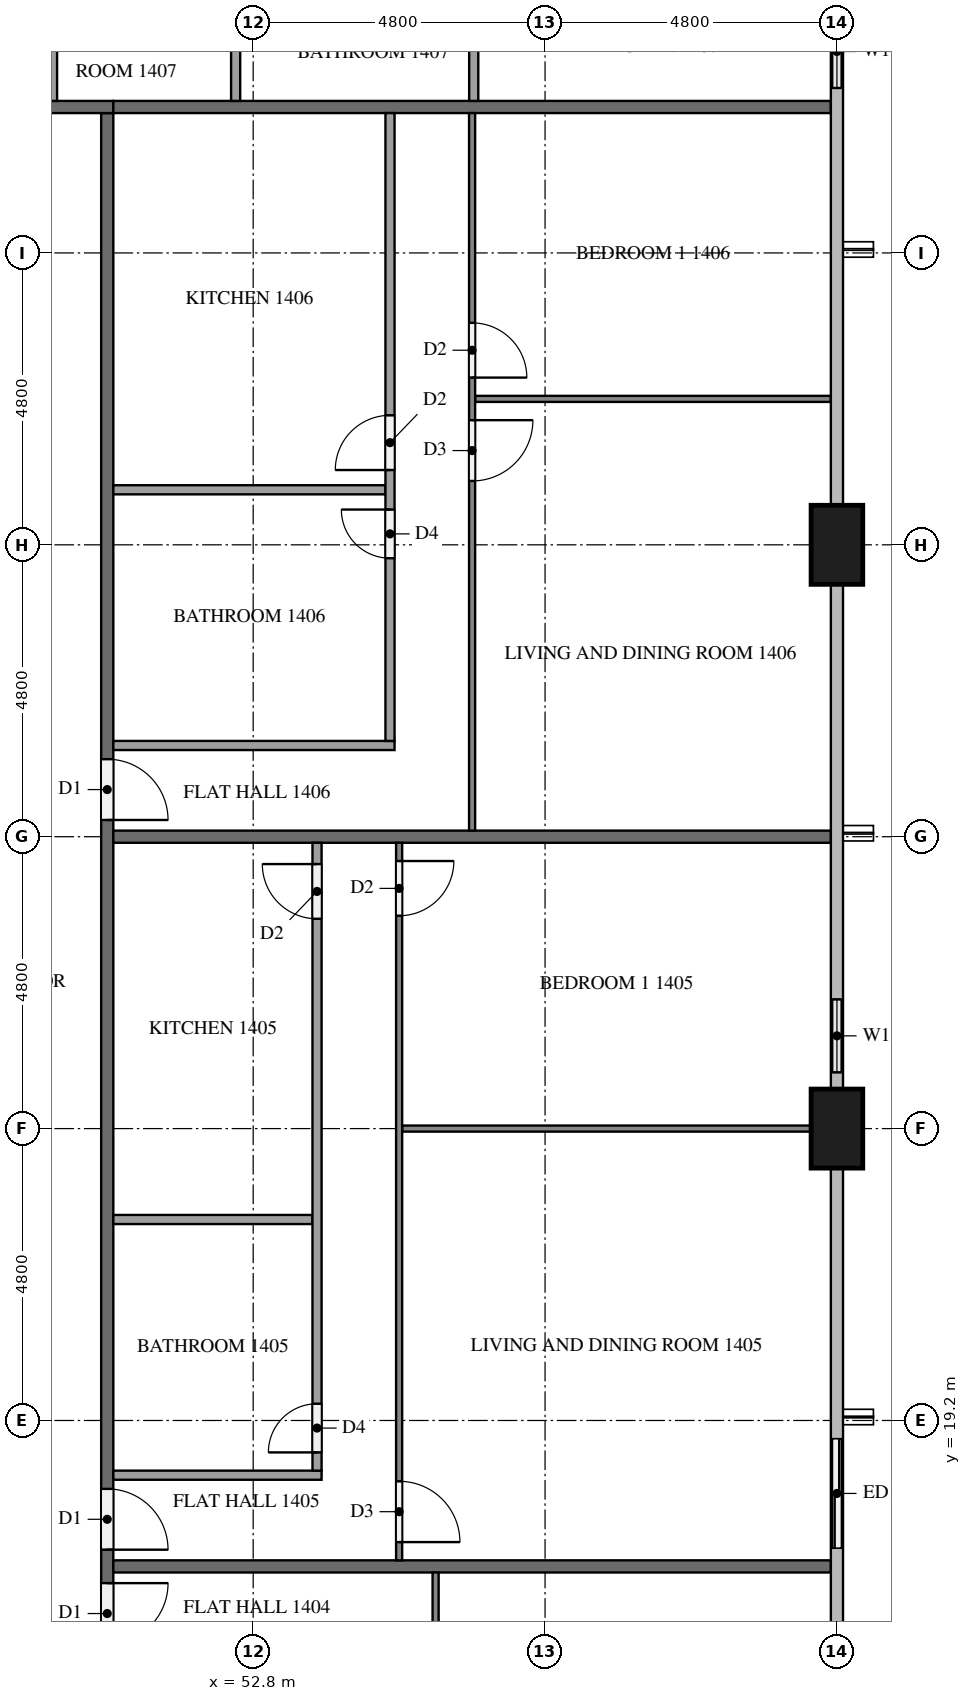
"""IFC4 building model, lengths in metres.
Left out: names, types, materials, properties, quantities, classifications, styles, units other than length and angle.
Written with IfcOpenShell. Run it as: python <this file> out.ifc"""

import sys

from ifc_helpers import new_model, si_unit, direction, frame, frame_2d, origin, origin_2d, place, context, subcontext, project, spatial, rectangle, extrude, element, fill, save


model = new_model("IFC4")
c1 = context("Model", 3, precision=1e-05, world=origin(), true_north=direction((0.0, 1.0)))
c2 = subcontext(c1, "Body", "Model", "MODEL_VIEW")
j1 = project(units=[si_unit("LENGTHUNIT", "METRE"), si_unit("PLANEANGLEUNIT", "RADIAN")], contexts=[c1])
p1 = place(None, origin())
s1 = spatial("IfcSite", under=j1, at=p1, CompositionType="ELEMENT")
p2 = place(p1, origin())
s2 = spatial("IfcBuilding", under=s1, at=p2, CompositionType="ELEMENT")
p3 = place(p2, frame((0.0, 0.0, 59.3)))
s3 = spatial("IfcBuildingStorey", under=s2, at=p3, CompositionType="ELEMENT", Elevation=59.3)
for number, where, z_axis, x_axis in (
    (1, (62.4, 24.0, 0.0), (0.0, 0.0, 1.0), (0.0, 1.0, 0.0)),
    (2, (62.4, 33.6, 0.0), (0.0, 0.0, 1.0), (0.0, 1.0, 0.0)),
):
    element("IfcColumn", number, at=place(p3, frame(where, z_axis=z_axis, x_axis=x_axis)), inside=s3, PredefinedType="COLUMN", context=c2, shape_type="SweptSolid", body=[
        extrude(rectangle(XDim=1.3, YDim=0.85, at=origin_2d()), origin(), (0.0, 0.0, 1.0), 3.2),
    ])
p4 = place(p3, frame((62.4, 16.8, 0.0), z_axis=(0.0, 0.0, 1.0), x_axis=(0.0, 1.0, 0.0)))
e3 = element("IfcWall", 3, at=p4, inside=s3, PredefinedType="SOLIDWALL", context=c2, shape_type="SweptSolid", body=[
    extrude(rectangle(XDim=2.4, YDim=0.15, at=frame_2d((1.2, 0.0))), origin(), (0.0, 0.0, 1.0), 3.2),
])
p5 = place(p4, frame((0.3, 0.0, 0.0)))
e4 = element("IfcOpeningElement", 4, at=p5, cuts=e3, PredefinedType="OPENING", context=c2, shape_type="SweptSolid", body=[
    extrude(rectangle(XDim=1.8, YDim=2.4, at=frame_2d((0.9, 1.2))), frame((0.0, 0.085, 0.0), z_axis=(0.0, -1.0, 0.0), x_axis=(1.0, 0.0, 0.0)), (0.0, 0.0, 1.0), 0.17),
])
p6 = place(p3, frame((62.4, 24.65, 0.0), z_axis=(0.0, 0.0, 1.0), x_axis=(0.0, 1.0, 0.0)))
e5 = element("IfcWall", 5, at=p6, inside=s3, PredefinedType="SOLIDWALL", context=c2, shape_type="SweptSolid", body=[
    extrude(rectangle(XDim=1.75, YDim=0.15, at=frame_2d((0.875, 0.0))), origin(), (0.0, 0.0, 1.0), 3.2),
])
p7 = place(p6, frame((0.275, 0.0, 0.9)))
e6 = element("IfcOpeningElement", 6, at=p7, cuts=e5, PredefinedType="OPENING", context=c2, shape_type="SweptSolid", body=[
    extrude(rectangle(XDim=1.2, YDim=1.4, at=frame_2d((0.6, 0.7))), frame((0.0, 0.085, 0.0), z_axis=(0.0, -1.0, 0.0), x_axis=(1.0, 0.0, 0.0)), (0.0, 0.0, 1.0), 0.17),
])
p8 = place(p3, frame((62.4, 40.8, 0.0), z_axis=(0.0, 0.0, 1.0), x_axis=(0.0, 1.0, 0.0)))
e7 = element("IfcWall", 7, at=p8, inside=s3, PredefinedType="SOLIDWALL", context=c2, shape_type="SweptSolid", body=[
    extrude(rectangle(XDim=1.825, YDim=0.15, at=frame_2d((0.913, 0.0))), origin(), (0.0, 0.0, 1.0), 3.2),
])
p9 = place(p8, frame((0.312, 0.0, 0.9)))
e8 = element("IfcOpeningElement", 8, at=p9, cuts=e7, PredefinedType="OPENING", context=c2, shape_type="SweptSolid", body=[
    extrude(rectangle(XDim=1.2, YDim=1.4, at=frame_2d((0.6, 0.7))), frame((0.0, 0.085, 0.0), z_axis=(0.0, -1.0, 0.0), x_axis=(1.0, 0.0, 0.0)), (0.0, 0.0, 1.0), 0.17),
])
p10 = place(p3, frame((50.4, 40.7, 0.0), z_axis=(0.0, 0.0, 1.0), x_axis=(0.0, -1.0, 0.0)))
e9 = element("IfcWall", 9, at=p10, inside=s3, PredefinedType="PARTITIONING", context=c2, shape_type="SweptSolid", body=[
    extrude(rectangle(XDim=28.6, YDim=0.2, at=frame_2d((14.3, 0.0))), origin(), (0.0, 0.0, 1.0), 3.2),
])
p11 = place(p10, frame((24.175, 0.0, 0.0)))
e10 = element("IfcOpeningElement", 10, at=p11, cuts=e9, PredefinedType="OPENING", context=c2, shape_type="SweptSolid", body=[
    extrude(rectangle(XDim=1.0, YDim=2.1, at=frame_2d((0.5, 1.05))), frame((0.0, 0.11, 0.0), z_axis=(0.0, -1.0, 0.0), x_axis=(1.0, 0.0, 0.0)), (0.0, 0.0, 1.0), 0.22),
])
p12 = place(p10, frame((22.625, 0.0, 0.0)))
e11 = element("IfcOpeningElement", 11, at=p12, cuts=e9, PredefinedType="OPENING", context=c2, shape_type="SweptSolid", body=[
    extrude(rectangle(XDim=1.0, YDim=2.1, at=frame_2d((0.5, 1.05))), frame((0.0, 0.11, 0.0), z_axis=(0.0, -1.0, 0.0), x_axis=(1.0, 0.0, 0.0)), (0.0, 0.0, 1.0), 0.22),
])
p13 = place(p10, frame((10.625, 0.0, 0.0)))
e12 = element("IfcOpeningElement", 12, at=p13, cuts=e9, PredefinedType="OPENING", context=c2, shape_type="SweptSolid", body=[
    extrude(rectangle(XDim=1.0, YDim=2.1, at=frame_2d((0.5, 1.05))), frame((0.0, 0.11, 0.0), z_axis=(0.0, -1.0, 0.0), x_axis=(1.0, 0.0, 0.0)), (0.0, 0.0, 1.0), 0.22),
])
p14 = place(p3, frame((11.9, 40.8, 0.0), z_axis=(0.0, 0.0, 1.0), x_axis=(1.0, 0.0, 0.0)))
e13 = element("IfcWall", 13, at=p14, inside=s3, PredefinedType="PARTITIONING", context=c2, shape_type="SweptSolid", body=[
    extrude(rectangle(XDim=38.6, YDim=0.2, at=frame_2d((19.3, 0.0))), origin(), (0.0, 0.0, 1.0), 3.2),
])
p15 = place(p14, frame((36.375, 0.0, 0.0)))
e14 = element("IfcOpeningElement", 14, at=p15, cuts=e13, PredefinedType="OPENING", context=c2, shape_type="SweptSolid", body=[
    extrude(rectangle(XDim=1.0, YDim=2.1, at=frame_2d((0.5, 1.05))), frame((0.0, 0.11, 0.0), z_axis=(0.0, -1.0, 0.0), x_axis=(1.0, 0.0, 0.0)), (0.0, 0.0, 1.0), 0.22),
])
p16 = place(p14, frame((17.125, 0.0, 0.0)))
e15 = element("IfcOpeningElement", 15, at=p16, cuts=e13, PredefinedType="OPENING", context=c2, shape_type="SweptSolid", body=[
    extrude(rectangle(XDim=1.1, YDim=2.1, at=frame_2d((0.55, 1.05))), frame((0.0, 0.11, 0.0), z_axis=(0.0, -1.0, 0.0), x_axis=(1.0, 0.0, 0.0)), (0.0, 0.0, 1.0), 0.22),
])
p17 = place(p14, frame((15.625, 0.0, 0.0)))
e16 = element("IfcOpeningElement", 16, at=p17, cuts=e13, PredefinedType="OPENING", context=c2, shape_type="SweptSolid", body=[
    extrude(rectangle(XDim=1.0, YDim=2.1, at=frame_2d((0.5, 1.05))), frame((0.0, 0.11, 0.0), z_axis=(0.0, -1.0, 0.0), x_axis=(1.0, 0.0, 0.0)), (0.0, 0.0, 1.0), 0.22),
])
p18 = place(p14, frame((1.225, 0.0, 0.0)))
e17 = element("IfcOpeningElement", 17, at=p18, cuts=e13, PredefinedType="OPENING", context=c2, shape_type="SweptSolid", body=[
    extrude(rectangle(XDim=1.0, YDim=2.1, at=frame_2d((0.5, 1.05))), frame((0.0, 0.11, 0.0), z_axis=(0.0, -1.0, 0.0), x_axis=(1.0, 0.0, 0.0)), (0.0, 0.0, 1.0), 0.22),
])
for number, where, z_axis, x_axis in (
    (18, (50.5, 16.8, 0.0), (0.0, 0.0, 1.0), (1.0, 0.0, 0.0)),
    (19, (50.5, 28.8, 0.0), (0.0, 0.0, 1.0), (1.0, 0.0, 0.0)),
    (20, (50.5, 40.8, 0.0), (0.0, 0.0, 1.0), (1.0, 0.0, 0.0)),
):
    element("IfcWall", number, at=place(p3, frame(where, z_axis=z_axis, x_axis=x_axis)), inside=s3, PredefinedType="PARTITIONING", context=c2, shape_type="SweptSolid", body=[
        extrude(rectangle(XDim=11.8, YDim=0.2, at=frame_2d((5.9, 0.0))), origin(), (0.0, 0.0, 1.0), 3.2),
    ])
p19 = place(p3, frame((55.8, 16.7, 0.0), z_axis=(0.0, 0.0, 1.0), x_axis=(0.0, -1.0, 0.0)))
e21 = element("IfcWall", 21, at=p19, inside=s3, PredefinedType="PARTITIONING", context=c2, shape_type="SweptSolid", body=[
    extrude(rectangle(XDim=16.6, YDim=0.1, at=frame_2d((8.3, 0.0))), origin(), (0.0, 0.0, 1.0), 3.2),
])
p20 = place(p19, frame((5.75, 0.0, 0.0)))
e22 = element("IfcOpeningElement", 22, at=p20, cuts=e21, PredefinedType="OPENING", context=c2, shape_type="SweptSolid", body=[
    extrude(rectangle(XDim=1.0, YDim=2.1, at=frame_2d((0.5, 1.05))), frame((0.0, 0.06, 0.0), z_axis=(0.0, -1.0, 0.0), x_axis=(1.0, 0.0, 0.0)), (0.0, 0.0, 1.0), 0.12),
])
p21 = place(p19, frame((7.45, 0.0, 0.0)))
e23 = element("IfcOpeningElement", 23, at=p21, cuts=e21, PredefinedType="OPENING", context=c2, shape_type="SweptSolid", body=[
    extrude(rectangle(XDim=0.9, YDim=2.1, at=frame_2d((0.45, 1.05))), frame((0.0, 0.06, 0.0), z_axis=(0.0, -1.0, 0.0), x_axis=(1.0, 0.0, 0.0)), (0.0, 0.0, 1.0), 0.12),
])
p22 = place(p19, frame((15.2, 0.0, 0.0)))
e24 = element("IfcOpeningElement", 24, at=p22, cuts=e21, PredefinedType="OPENING", context=c2, shape_type="SweptSolid", body=[
    extrude(rectangle(XDim=0.9, YDim=2.1, at=frame_2d((0.45, 1.05))), frame((0.0, 0.06, 0.0), z_axis=(0.0, -1.0, 0.0), x_axis=(1.0, 0.0, 0.0)), (0.0, 0.0, 1.0), 0.12),
])
p23 = place(p3, frame((55.25, 24.0, 0.0), z_axis=(0.0, 0.0, 1.0), x_axis=(1.0, 0.0, 0.0)))
e25 = element("IfcWall", 25, at=p23, inside=s3, PredefinedType="PARTITIONING", context=c2, shape_type="SweptSolid", body=[
    extrude(rectangle(XDim=6.725, YDim=0.1, at=frame_2d((3.363, 0.0))), origin(), (0.0, 0.0, 1.0), 3.2),
])
p24 = place(p3, frame((55.2, 28.7, 0.0), z_axis=(0.0, 0.0, 1.0), x_axis=(0.0, -1.0, 0.0)))
e26 = element("IfcWall", 26, at=p24, inside=s3, PredefinedType="PARTITIONING", context=c2, shape_type="SweptSolid", body=[
    extrude(rectangle(XDim=11.8, YDim=0.1, at=frame_2d((5.9, 0.0))), origin(), (0.0, 0.0, 1.0), 3.2),
])
p25 = place(p24, frame((10.5, 0.0, 0.0)))
e27 = element("IfcOpeningElement", 27, at=p25, cuts=e26, PredefinedType="OPENING", context=c2, shape_type="SweptSolid", body=[
    extrude(rectangle(XDim=1.0, YDim=2.1, at=frame_2d((0.5, 1.05))), frame((0.0, 0.06, 0.0), z_axis=(0.0, -1.0, 0.0), x_axis=(1.0, 0.0, 0.0)), (0.0, 0.0, 1.0), 0.12),
])
p26 = place(p24, frame((0.3, 0.0, 0.0)))
e28 = element("IfcOpeningElement", 28, at=p26, cuts=e26, PredefinedType="OPENING", context=c2, shape_type="SweptSolid", body=[
    extrude(rectangle(XDim=0.9, YDim=2.1, at=frame_2d((0.45, 1.05))), frame((0.0, 0.06, 0.0), z_axis=(0.0, -1.0, 0.0), x_axis=(1.0, 0.0, 0.0)), (0.0, 0.0, 1.0), 0.12),
])
p27 = place(p3, frame((50.5, 22.505, 0.0), z_axis=(0.0, 0.0, 1.0), x_axis=(1.0, 0.0, 0.0)))
e29 = element("IfcWall", 29, at=p27, inside=s3, PredefinedType="PARTITIONING", context=c2, shape_type="SweptSolid", body=[
    extrude(rectangle(XDim=3.275, YDim=0.15, at=frame_2d((1.637, 0.0))), origin(), (0.0, 0.0, 1.0), 3.2),
])
p28 = place(p3, frame((50.5, 18.3, 0.0), z_axis=(0.0, 0.0, 1.0), x_axis=(1.0, 0.0, 0.0)))
e30 = element("IfcWall", 30, at=p28, inside=s3, PredefinedType="PARTITIONING", context=c2, shape_type="SweptSolid", body=[
    extrude(rectangle(XDim=3.425, YDim=0.15, at=frame_2d((1.712, 0.0))), origin(), (0.0, 0.0, 1.0), 3.2),
])
p29 = place(p3, frame((53.85, 18.375, 0.0), z_axis=(0.0, 0.0, 1.0), x_axis=(0.0, 1.0, 0.0)))
e31 = element("IfcWall", 31, at=p29, inside=s3, PredefinedType="PARTITIONING", context=c2, shape_type="SweptSolid", body=[
    extrude(rectangle(XDim=10.325, YDim=0.15, at=frame_2d((5.163, 0.0))), origin(), (0.0, 0.0, 1.0), 3.2),
])
p30 = place(p29, frame((0.3, 0.0, 0.0)))
e32 = element("IfcOpeningElement", 32, at=p30, cuts=e31, PredefinedType="OPENING", context=c2, shape_type="SweptSolid", body=[
    extrude(rectangle(XDim=0.8, YDim=2.1, at=frame_2d((0.4, 1.05))), frame((0.0, 0.085, 0.0), z_axis=(0.0, -1.0, 0.0), x_axis=(1.0, 0.0, 0.0)), (0.0, 0.0, 1.0), 0.17),
])
p31 = place(p29, frame((9.075, 0.0, 0.0)))
e33 = element("IfcOpeningElement", 33, at=p31, cuts=e31, PredefinedType="OPENING", context=c2, shape_type="SweptSolid", body=[
    extrude(rectangle(XDim=0.9, YDim=2.1, at=frame_2d((0.45, 1.05))), frame((0.0, 0.085, 0.0), z_axis=(0.0, -1.0, 0.0), x_axis=(1.0, 0.0, 0.0)), (0.0, 0.0, 1.0), 0.17),
])
p32 = place(p3, frame((56.45, 36.0, 0.0), z_axis=(0.0, 0.0, 1.0), x_axis=(1.0, 0.0, 0.0)))
e34 = element("IfcWall", 34, at=p32, inside=s3, PredefinedType="PARTITIONING", context=c2, shape_type="SweptSolid", body=[
    extrude(rectangle(XDim=5.85, YDim=0.1, at=frame_2d((2.925, 0.0))), origin(), (0.0, 0.0, 1.0), 3.2),
])
p33 = place(p3, frame((56.4, 40.7, 0.0), z_axis=(0.0, 0.0, 1.0), x_axis=(0.0, -1.0, 0.0)))
e35 = element("IfcWall", 35, at=p33, inside=s3, PredefinedType="PARTITIONING", context=c2, shape_type="SweptSolid", body=[
    extrude(rectangle(XDim=11.8, YDim=0.1, at=frame_2d((5.9, 0.0))), origin(), (0.0, 0.0, 1.0), 3.2),
])
p34 = place(p33, frame((5.05, 0.0, 0.0)))
e36 = element("IfcOpeningElement", 36, at=p34, cuts=e35, PredefinedType="OPENING", context=c2, shape_type="SweptSolid", body=[
    extrude(rectangle(XDim=1.0, YDim=2.1, at=frame_2d((0.5, 1.05))), frame((0.0, 0.06, 0.0), z_axis=(0.0, -1.0, 0.0), x_axis=(1.0, 0.0, 0.0)), (0.0, 0.0, 1.0), 0.12),
])
p35 = place(p33, frame((3.45, 0.0, 0.0)))
e37 = element("IfcOpeningElement", 37, at=p35, cuts=e35, PredefinedType="OPENING", context=c2, shape_type="SweptSolid", body=[
    extrude(rectangle(XDim=0.9, YDim=2.1, at=frame_2d((0.45, 1.05))), frame((0.0, 0.06, 0.0), z_axis=(0.0, -1.0, 0.0), x_axis=(1.0, 0.0, 0.0)), (0.0, 0.0, 1.0), 0.12),
])
p36 = place(p3, frame((50.5, 34.505, 0.0), z_axis=(0.0, 0.0, 1.0), x_axis=(1.0, 0.0, 0.0)))
e38 = element("IfcWall", 38, at=p36, inside=s3, PredefinedType="PARTITIONING", context=c2, shape_type="SweptSolid", body=[
    extrude(rectangle(XDim=4.475, YDim=0.15, at=frame_2d((2.238, 0.0))), origin(), (0.0, 0.0, 1.0), 3.2),
])
p37 = place(p3, frame((50.5, 30.3, 0.0), z_axis=(0.0, 0.0, 1.0), x_axis=(1.0, 0.0, 0.0)))
e39 = element("IfcWall", 39, at=p37, inside=s3, PredefinedType="PARTITIONING", context=c2, shape_type="SweptSolid", body=[
    extrude(rectangle(XDim=4.625, YDim=0.15, at=frame_2d((2.312, 0.0))), origin(), (0.0, 0.0, 1.0), 3.2),
])
p38 = place(p3, frame((55.05, 30.375, 0.0), z_axis=(0.0, 0.0, 1.0), x_axis=(0.0, 1.0, 0.0)))
e40 = element("IfcWall", 40, at=p38, inside=s3, PredefinedType="PARTITIONING", context=c2, shape_type="SweptSolid", body=[
    extrude(rectangle(XDim=10.325, YDim=0.15, at=frame_2d((5.163, 0.0))), origin(), (0.0, 0.0, 1.0), 3.2),
])
p39 = place(p38, frame((3.005, 0.0, 0.0)))
e41 = element("IfcOpeningElement", 41, at=p39, cuts=e40, PredefinedType="OPENING", context=c2, shape_type="SweptSolid", body=[
    extrude(rectangle(XDim=0.8, YDim=2.1, at=frame_2d((0.4, 1.05))), frame((0.0, 0.085, 0.0), z_axis=(0.0, -1.0, 0.0), x_axis=(1.0, 0.0, 0.0)), (0.0, 0.0, 1.0), 0.17),
])
p40 = place(p38, frame((4.455, 0.0, 0.0)))
e42 = element("IfcOpeningElement", 42, at=p40, cuts=e40, PredefinedType="OPENING", context=c2, shape_type="SweptSolid", body=[
    extrude(rectangle(XDim=0.9, YDim=2.1, at=frame_2d((0.45, 1.05))), frame((0.0, 0.085, 0.0), z_axis=(0.0, -1.0, 0.0), x_axis=(1.0, 0.0, 0.0)), (0.0, 0.0, 1.0), 0.17),
])
for number, where, z_axis, x_axis in (
    (43, (52.511, 40.9, 0.0), (0.0, 0.0, 1.0), (0.0, 1.0, 0.0)),
    (44, (56.427, 40.9, 0.0), (0.0, 0.0, 1.0), (0.0, 1.0, 0.0)),
):
    element("IfcWall", number, at=place(p3, frame(where, z_axis=z_axis, x_axis=x_axis)), inside=s3, PredefinedType="PARTITIONING", context=c2, shape_type="SweptSolid", body=[
        extrude(rectangle(XDim=1.775, YDim=0.15, at=frame_2d((0.888, 0.0))), origin(), (0.0, 0.0, 1.0), 3.2),
    ])
p41 = place(p3, frame((49.5, 40.9, 0.0), z_axis=(0.0, 0.0, 1.0), x_axis=(0.0, 1.0, 0.0)))
e45 = element("IfcWall", 45, at=p41, inside=s3, PredefinedType="PARTITIONING", context=c2, shape_type="SweptSolid", body=[
    extrude(rectangle(XDim=1.925, YDim=0.15, at=frame_2d((0.962, 0.0))), origin(), (0.0, 0.0, 1.0), 3.2),
])
p42 = place(p5, origin())
e46 = element("IfcDoor", 46, at=p42, inside=s3, OperationType="SLIDING_TO_LEFT", PredefinedType="DOOR", context=c2, shape_type="SweptSolid", body=[
    extrude(rectangle(XDim=1.8, YDim=2.4, at=frame_2d((0.9, 1.2))), frame((0.0, 0.025, 0.0), z_axis=(0.0, -1.0, 0.0), x_axis=(1.0, 0.0, 0.0)), (0.0, 0.0, 1.0), 0.05),
])
fill(e4, e46)
p43 = place(p7, origin())
e47 = element("IfcWindow", 47, at=p43, inside=s3, PartitioningType="SINGLE_PANEL", PredefinedType="WINDOW", context=c2, shape_type="SweptSolid", body=[
    extrude(rectangle(XDim=1.2, YDim=1.4, at=frame_2d((0.6, 0.7))), frame((0.0, 0.03, 0.0), z_axis=(0.0, -1.0, 0.0), x_axis=(1.0, 0.0, 0.0)), (0.0, 0.0, 1.0), 0.06),
])
fill(e6, e47)
p44 = place(p9, origin())
e48 = element("IfcWindow", 48, at=p44, inside=s3, PartitioningType="SINGLE_PANEL", PredefinedType="WINDOW", context=c2, shape_type="SweptSolid", body=[
    extrude(rectangle(XDim=1.2, YDim=1.4, at=frame_2d((0.6, 0.7))), frame((0.0, 0.03, 0.0), z_axis=(0.0, -1.0, 0.0), x_axis=(1.0, 0.0, 0.0)), (0.0, 0.0, 1.0), 0.06),
])
fill(e8, e48)
p45 = place(p11, origin())
e49 = element("IfcDoor", 49, at=p45, inside=s3, OperationType="SINGLE_SWING_LEFT", PredefinedType="DOOR", context=c2, shape_type="SweptSolid", body=[
    extrude(rectangle(XDim=1.0, YDim=2.1, at=frame_2d((0.5, 1.05))), frame((0.0, 0.025, 0.0), z_axis=(0.0, -1.0, 0.0), x_axis=(1.0, 0.0, 0.0)), (0.0, 0.0, 1.0), 0.05),
])
fill(e10, e49)
p46 = place(p12, origin())
e50 = element("IfcDoor", 50, at=p46, inside=s3, OperationType="SINGLE_SWING_RIGHT", PredefinedType="DOOR", context=c2, shape_type="SweptSolid", body=[
    extrude(rectangle(XDim=1.0, YDim=2.1, at=frame_2d((0.5, 1.05))), frame((0.0, 0.025, 0.0), z_axis=(0.0, -1.0, 0.0), x_axis=(1.0, 0.0, 0.0)), (0.0, 0.0, 1.0), 0.05),
])
fill(e11, e50)
p47 = place(p13, origin())
e51 = element("IfcDoor", 51, at=p47, inside=s3, OperationType="SINGLE_SWING_RIGHT", PredefinedType="DOOR", context=c2, shape_type="SweptSolid", body=[
    extrude(rectangle(XDim=1.0, YDim=2.1, at=frame_2d((0.5, 1.05))), frame((0.0, 0.025, 0.0), z_axis=(0.0, -1.0, 0.0), x_axis=(1.0, 0.0, 0.0)), (0.0, 0.0, 1.0), 0.05),
])
fill(e12, e51)
p48 = place(p25, origin())
e52 = element("IfcDoor", 52, at=p48, inside=s3, OperationType="SINGLE_SWING_RIGHT", PredefinedType="DOOR", context=c2, shape_type="SweptSolid", body=[
    extrude(rectangle(XDim=1.0, YDim=2.1, at=frame_2d((0.5, 1.05))), frame((0.0, 0.025, 0.0), z_axis=(0.0, -1.0, 0.0), x_axis=(1.0, 0.0, 0.0)), (0.0, 0.0, 1.0), 0.05),
])
fill(e27, e52)
p49 = place(p26, origin())
e53 = element("IfcDoor", 53, at=p49, inside=s3, OperationType="SINGLE_SWING_LEFT", PredefinedType="DOOR", context=c2, shape_type="SweptSolid", body=[
    extrude(rectangle(XDim=0.9, YDim=2.1, at=frame_2d((0.45, 1.05))), frame((0.0, 0.025, 0.0), z_axis=(0.0, -1.0, 0.0), x_axis=(1.0, 0.0, 0.0)), (0.0, 0.0, 1.0), 0.05),
])
fill(e28, e53)
p50 = place(p30, origin())
e54 = element("IfcDoor", 54, at=p50, inside=s3, OperationType="SINGLE_SWING_LEFT", PredefinedType="DOOR", context=c2, shape_type="SweptSolid", body=[
    extrude(rectangle(XDim=0.8, YDim=2.1, at=frame_2d((0.4, 1.05))), frame((0.0, 0.025, 0.0), z_axis=(0.0, -1.0, 0.0), x_axis=(1.0, 0.0, 0.0)), (0.0, 0.0, 1.0), 0.05),
])
fill(e32, e54)
p51 = place(p31, origin())
e55 = element("IfcDoor", 55, at=p51, inside=s3, OperationType="SINGLE_SWING_RIGHT", PredefinedType="DOOR", context=c2, shape_type="SweptSolid", body=[
    extrude(rectangle(XDim=0.9, YDim=2.1, at=frame_2d((0.45, 1.05))), frame((0.0, 0.025, 0.0), z_axis=(0.0, -1.0, 0.0), x_axis=(1.0, 0.0, 0.0)), (0.0, 0.0, 1.0), 0.05),
])
fill(e33, e55)
p52 = place(p34, origin())
e56 = element("IfcDoor", 56, at=p52, inside=s3, OperationType="SINGLE_SWING_LEFT", PredefinedType="DOOR", context=c2, shape_type="SweptSolid", body=[
    extrude(rectangle(XDim=1.0, YDim=2.1, at=frame_2d((0.5, 1.05))), frame((0.0, 0.025, 0.0), z_axis=(0.0, -1.0, 0.0), x_axis=(1.0, 0.0, 0.0)), (0.0, 0.0, 1.0), 0.05),
])
fill(e36, e56)
p53 = place(p35, origin())
e57 = element("IfcDoor", 57, at=p53, inside=s3, OperationType="SINGLE_SWING_RIGHT", PredefinedType="DOOR", context=c2, shape_type="SweptSolid", body=[
    extrude(rectangle(XDim=0.9, YDim=2.1, at=frame_2d((0.45, 1.05))), frame((0.0, 0.025, 0.0), z_axis=(0.0, -1.0, 0.0), x_axis=(1.0, 0.0, 0.0)), (0.0, 0.0, 1.0), 0.05),
])
fill(e37, e57)
p54 = place(p39, origin())
e58 = element("IfcDoor", 58, at=p54, inside=s3, OperationType="SINGLE_SWING_RIGHT", PredefinedType="DOOR", context=c2, shape_type="SweptSolid", body=[
    extrude(rectangle(XDim=0.8, YDim=2.1, at=frame_2d((0.4, 1.05))), frame((0.0, 0.025, 0.0), z_axis=(0.0, -1.0, 0.0), x_axis=(1.0, 0.0, 0.0)), (0.0, 0.0, 1.0), 0.05),
])
fill(e41, e58)
p55 = place(p40, origin())
e59 = element("IfcDoor", 59, at=p55, inside=s3, OperationType="SINGLE_SWING_LEFT", PredefinedType="DOOR", context=c2, shape_type="SweptSolid", body=[
    extrude(rectangle(XDim=0.9, YDim=2.1, at=frame_2d((0.45, 1.05))), frame((0.0, 0.025, 0.0), z_axis=(0.0, -1.0, 0.0), x_axis=(1.0, 0.0, 0.0)), (0.0, 0.0, 1.0), 0.05),
])
fill(e42, e59)
save(model, sys.argv[1])
